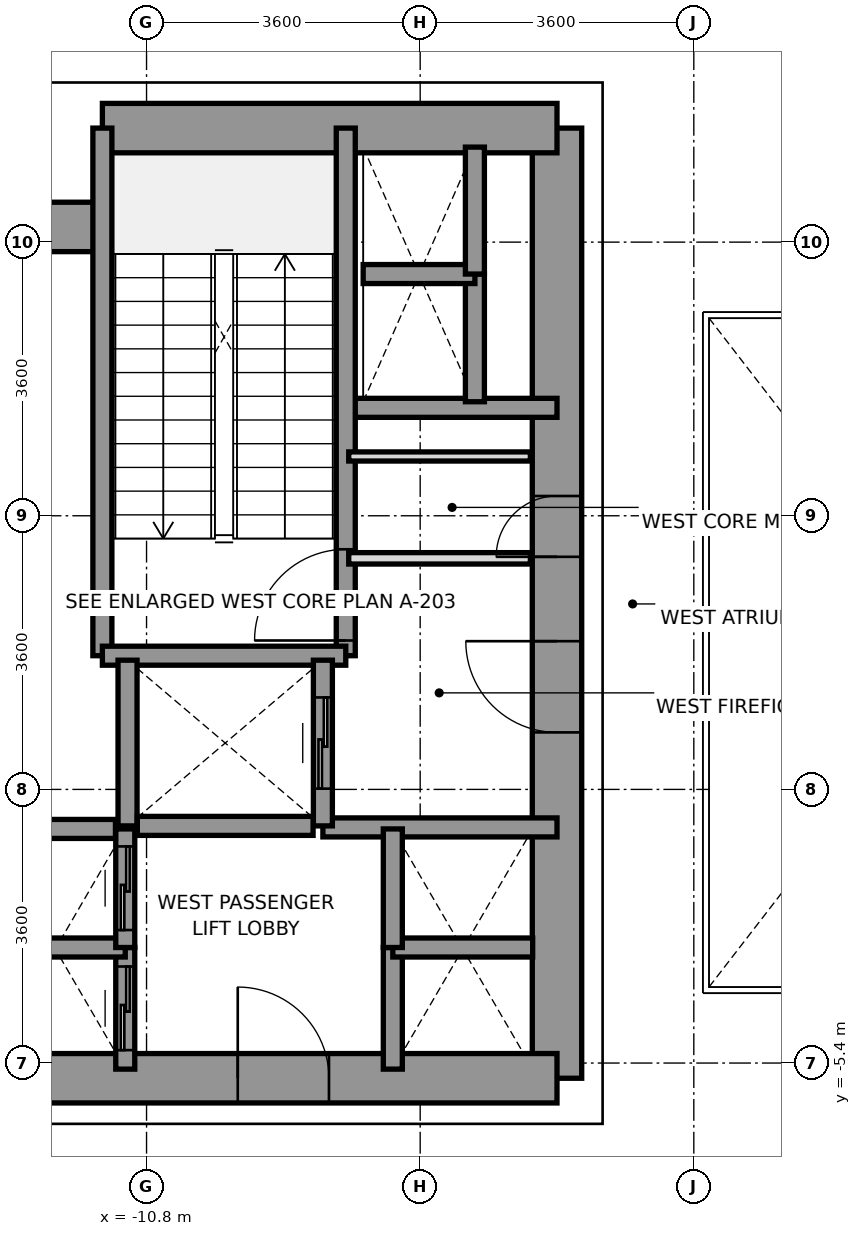
"""IFC4 building model, lengths in metres.
Left out: names, types, materials, properties, quantities, classifications, styles, units other than length and angle.
Written with IfcOpenShell. Run it as: python <this file> out.ifc"""

import sys

from ifc_helpers import new_model, si_unit, direction, frame, frame_2d, origin, place, context, subcontext, project, spatial, rectangle, extrude, source, transform, mapped, element, fill, save


model = new_model("IFC4")
c1 = context("Model", 3, precision=1e-05, world=origin(), true_north=direction((0.0, 1.0)))
c2 = subcontext(c1, "Body", "Model", "MODEL_VIEW")
j1 = project(units=[si_unit("LENGTHUNIT", "METRE"), si_unit("PLANEANGLEUNIT", "RADIAN")], contexts=[c1])
p1 = place(None, origin())
s1 = spatial("IfcSite", under=j1, at=p1, CompositionType="ELEMENT")
p2 = place(p1, origin())
s2 = spatial("IfcBuilding", under=s1, at=p2, CompositionType="ELEMENT")
p3 = place(p2, frame((0.0, 0.0, 20.4)))
s3 = spatial("IfcBuildingStorey", under=s2, at=p3, CompositionType="ELEMENT", Elevation=20.4)
p4 = place(p3, frame((-5.4, -5.6, 0.0), z_axis=(0.0, 0.0, 1.0), x_axis=(0.0, 1.0, 0.0)))
e1 = element("IfcWall", 1, at=p4, inside=s3, PredefinedType="SHEAR", context=c2, shape_type="SweptSolid", body=[
    extrude(rectangle(XDim=12.5, YDim=0.65, at=frame_2d((6.25, 0.0))), origin(), (0.0, 0.0, 1.0), 4.48),
])
p5 = place(p4, frame((4.55, 0.0, 0.0)))
e2 = element("IfcOpeningElement", 2, at=p5, cuts=e1, PredefinedType="OPENING", context=c2, shape_type="SweptSolid", body=[
    extrude(rectangle(XDim=1.2, YDim=2.2, at=frame_2d((0.6, 1.1))), frame((0.0, 0.335, 0.0), z_axis=(0.0, -1.0, 0.0), x_axis=(1.0, 0.0, 0.0)), (0.0, 0.0, 1.0), 0.67),
])
p6 = place(p4, frame((6.86, 0.0, 0.0)))
e3 = element("IfcOpeningElement", 3, at=p6, cuts=e1, PredefinedType="OPENING", context=c2, shape_type="SweptSolid", body=[
    extrude(rectangle(XDim=0.8, YDim=2.1, at=frame_2d((0.4, 1.05))), frame((0.0, 0.335, 0.0), z_axis=(0.0, -1.0, 0.0), x_axis=(1.0, 0.0, 0.0)), (0.0, 0.0, 1.0), 0.67),
])
p7 = place(p3, frame((-11.381, 6.9, 0.0), z_axis=(0.0, 0.0, 1.0), x_axis=(1.0, 0.0, 0.0)))
e4 = element("IfcWall", 4, at=p7, inside=s3, PredefinedType="SHEAR", context=c2, shape_type="SweptSolid", body=[
    extrude(rectangle(XDim=5.981, YDim=0.65, at=frame_2d((2.991, 0.0))), origin(), (0.0, 0.0, 1.0), 4.48),
])
p8 = place(p3, frame((-13.2, 5.6, 0.0), z_axis=(0.0, 0.0, 1.0), x_axis=(1.0, 0.0, 0.0)))
e5 = element("IfcWall", 5, at=p8, inside=s3, PredefinedType="SHEAR", context=c2, shape_type="SweptSolid", body=[
    extrude(rectangle(XDim=1.819, YDim=0.65, at=frame_2d((0.909, 0.0))), origin(), (0.0, 0.0, 1.0), 4.48),
])
p9 = place(p3, frame((-13.2, -5.6, 0.0), z_axis=(0.0, 0.0, 1.0), x_axis=(1.0, 0.0, 0.0)))
e6 = element("IfcWall", 6, at=p9, inside=s3, PredefinedType="SHEAR", context=c2, shape_type="SweptSolid", body=[
    extrude(rectangle(XDim=7.8, YDim=0.65, at=frame_2d((3.9, 0.0))), origin(), (0.0, 0.0, 1.0), 4.48),
])
p10 = place(p9, frame((3.6, 0.0, 0.0)))
e7 = element("IfcOpeningElement", 7, at=p10, cuts=e6, PredefinedType="OPENING", context=c2, shape_type="SweptSolid", body=[
    extrude(rectangle(XDim=1.2, YDim=2.2, at=frame_2d((0.6, 1.1))), frame((0.0, 0.335, 0.0), z_axis=(0.0, -1.0, 0.0), x_axis=(1.0, 0.0, 0.0)), (0.0, 0.0, 1.0), 0.67),
])
p11 = place(p3, frame((-8.18, 3.22, 0.0), z_axis=(0.0, 0.0, 1.0), x_axis=(1.0, 0.0, 0.0)))
e8 = element("IfcWall", 8, at=p11, inside=s3, PredefinedType="SOLIDWALL", context=c2, shape_type="SweptSolid", body=[
    extrude(rectangle(XDim=2.78, YDim=0.25, at=frame_2d((1.39, 0.0))), origin(), (0.0, 0.0, 1.0), 4.48),
])
p12 = place(p3, frame((-8.48, -2.3, 0.0), z_axis=(0.0, 0.0, 1.0), x_axis=(1.0, 0.0, 0.0)))
e9 = element("IfcWall", 9, at=p12, inside=s3, PredefinedType="SOLIDWALL", context=c2, shape_type="SweptSolid", body=[
    extrude(rectangle(XDim=3.08, YDim=0.25, at=frame_2d((1.54, 0.0))), origin(), (0.0, 0.0, 1.0), 4.48),
])
p13 = place(p3, frame((-8.179, -0.041, 0.0), z_axis=(0.0, 0.0, 1.0), x_axis=(0.0, 1.0, 0.0)))
e10 = element("IfcWall", 10, at=p13, inside=s3, PredefinedType="SOLIDWALL", context=c2, shape_type="SweptSolid", body=[
    extrude(rectangle(XDim=6.941, YDim=0.25, at=frame_2d((3.47, 0.0))), origin(), (0.0, 0.0, 1.0), 4.48),
])
p14 = place(p13, frame((0.2, 0.0, 0.0)))
e11 = element("IfcOpeningElement", 11, at=p14, cuts=e10, PredefinedType="OPENING", context=c2, shape_type="SweptSolid", body=[
    extrude(rectangle(XDim=1.2, YDim=2.2, at=frame_2d((0.6, 1.1))), frame((0.0, 0.135, 0.0), z_axis=(0.0, -1.0, 0.0), x_axis=(1.0, 0.0, 0.0)), (0.0, 0.0, 1.0), 0.27),
])
p15 = place(p3, frame((-11.381, -0.041, 0.0), z_axis=(0.0, 0.0, 1.0), x_axis=(0.0, 1.0, 0.0)))
e12 = element("IfcWall", 12, at=p15, inside=s3, PredefinedType="SOLIDWALL", context=c2, shape_type="SweptSolid", body=[
    extrude(rectangle(XDim=6.941, YDim=0.25, at=frame_2d((3.47, 0.0))), origin(), (0.0, 0.0, 1.0), 4.48),
])
p16 = place(p3, frame((-11.381, -0.041, 0.0), z_axis=(0.0, 0.0, 1.0), x_axis=(1.0, 0.0, 0.0)))
e13 = element("IfcWall", 13, at=p16, inside=s3, PredefinedType="SOLIDWALL", context=c2, shape_type="SweptSolid", body=[
    extrude(rectangle(XDim=3.202, YDim=0.25, at=frame_2d((1.601, 0.0))), origin(), (0.0, 0.0, 1.0), 4.48),
])
p17 = place(p3, frame((-11.05, -2.28, 0.0), z_axis=(0.0, 0.0, 1.0), x_axis=(0.0, 1.0, 0.0)))
e14 = element("IfcWall", 14, at=p17, inside=s3, PredefinedType="SOLIDWALL", context=c2, shape_type="SweptSolid", body=[
    extrude(rectangle(XDim=2.18, YDim=0.25, at=frame_2d((1.09, 0.0))), origin(), (0.0, 0.0, 1.0), 4.48),
])
p18 = place(p3, frame((-8.48, -2.28, 0.0), z_axis=(0.0, 0.0, 1.0), x_axis=(0.0, 1.0, 0.0)))
e15 = element("IfcWall", 15, at=p18, inside=s3, PredefinedType="SOLIDWALL", context=c2, shape_type="SweptSolid", body=[
    extrude(rectangle(XDim=2.18, YDim=0.25, at=frame_2d((1.09, 0.0))), origin(), (0.0, 0.0, 1.0), 4.48),
])
p19 = place(p18, frame((0.49, 0.0, 0.0)))
e16 = element("IfcOpeningElement", 16, at=p19, cuts=e15, PredefinedType="OPENING", context=c2, shape_type="SweptSolid", body=[
    extrude(rectangle(XDim=1.2, YDim=2.2, at=frame_2d((0.6, 1.1))), frame((0.0, 0.135, 0.0), z_axis=(0.0, -1.0, 0.0), x_axis=(1.0, 0.0, 0.0)), (0.0, 0.0, 1.0), 0.27),
])
p20 = place(p3, frame((-10.921, -2.28, 0.0), z_axis=(0.0, 0.0, 1.0), x_axis=(1.0, 0.0, 0.0)))
e17 = element("IfcWall", 17, at=p20, inside=s3, PredefinedType="SOLIDWALL", context=c2, shape_type="SweptSolid", body=[
    extrude(rectangle(XDim=2.312, YDim=0.25, at=frame_2d((1.156, 0.0))), origin(), (0.0, 0.0, 1.0), 4.48),
])
p21 = place(p3, frame((-11.08, -5.48, 0.0), z_axis=(0.0, 0.0, 1.0), x_axis=(0.0, 1.0, 0.0)))
e18 = element("IfcWall", 18, at=p21, inside=s3, PredefinedType="SOLIDWALL", context=c2, shape_type="SweptSolid", body=[
    extrude(rectangle(XDim=1.6, YDim=0.25, at=frame_2d((0.8, 0.0))), origin(), (0.0, 0.0, 1.0), 4.48),
])
p22 = place(p21, frame((0.25, 0.0, 0.0)))
e19 = element("IfcOpeningElement", 19, at=p22, cuts=e18, PredefinedType="OPENING", context=c2, shape_type="SweptSolid", body=[
    extrude(rectangle(XDim=1.1, YDim=2.2, at=frame_2d((0.55, 1.1))), frame((0.0, 0.135, 0.0), z_axis=(0.0, -1.0, 0.0), x_axis=(1.0, 0.0, 0.0)), (0.0, 0.0, 1.0), 0.27),
])
p23 = place(p3, frame((-12.92, -3.88, 0.0), z_axis=(0.0, 0.0, 1.0), x_axis=(1.0, 0.0, 0.0)))
e20 = element("IfcWall", 20, at=p23, inside=s3, PredefinedType="SOLIDWALL", context=c2, shape_type="SweptSolid", body=[
    extrude(rectangle(XDim=1.84, YDim=0.25, at=frame_2d((0.92, 0.0))), origin(), (0.0, 0.0, 1.0), 4.48),
])
p24 = place(p3, frame((-11.08, -3.88, 0.0), z_axis=(0.0, 0.0, 1.0), x_axis=(0.0, 1.0, 0.0)))
e21 = element("IfcWall", 21, at=p24, inside=s3, PredefinedType="SOLIDWALL", context=c2, shape_type="SweptSolid", body=[
    extrude(rectangle(XDim=1.56, YDim=0.25, at=frame_2d((0.78, 0.0))), origin(), (0.0, 0.0, 1.0), 4.48),
])
p25 = place(p24, frame((0.23, 0.0, 0.0)))
e22 = element("IfcOpeningElement", 22, at=p25, cuts=e21, PredefinedType="OPENING", context=c2, shape_type="SweptSolid", body=[
    extrude(rectangle(XDim=1.1, YDim=2.2, at=frame_2d((0.55, 1.1))), frame((0.0, 0.135, 0.0), z_axis=(0.0, -1.0, 0.0), x_axis=(1.0, 0.0, 0.0)), (0.0, 0.0, 1.0), 0.27),
])
p26 = place(p3, frame((-12.791, -2.32, 0.0), z_axis=(0.0, 0.0, 1.0), x_axis=(1.0, 0.0, 0.0)))
e23 = element("IfcWall", 23, at=p26, inside=s3, PredefinedType="SOLIDWALL", context=c2, shape_type="SweptSolid", body=[
    extrude(rectangle(XDim=1.582, YDim=0.25, at=frame_2d((0.791, 0.0))), origin(), (0.0, 0.0, 1.0), 4.48),
])
p27 = place(p3, frame((-7.56, -5.48, 0.0), z_axis=(0.0, 0.0, 1.0), x_axis=(0.0, 1.0, 0.0)))
e24 = element("IfcWall", 24, at=p27, inside=s3, PredefinedType="SOLIDWALL", context=c2, shape_type="SweptSolid", body=[
    extrude(rectangle(XDim=1.6, YDim=0.25, at=frame_2d((0.8, 0.0))), origin(), (0.0, 0.0, 1.0), 4.48),
])
p28 = place(p3, frame((-7.56, -3.88, 0.0), z_axis=(0.0, 0.0, 1.0), x_axis=(1.0, 0.0, 0.0)))
e25 = element("IfcWall", 25, at=p28, inside=s3, PredefinedType="SOLIDWALL", context=c2, shape_type="SweptSolid", body=[
    extrude(rectangle(XDim=1.84, YDim=0.25, at=frame_2d((0.92, 0.0))), origin(), (0.0, 0.0, 1.0), 4.48),
])
p29 = place(p3, frame((-7.56, -3.88, 0.0), z_axis=(0.0, 0.0, 1.0), x_axis=(0.0, 1.0, 0.0)))
e26 = element("IfcWall", 26, at=p29, inside=s3, PredefinedType="SOLIDWALL", context=c2, shape_type="SweptSolid", body=[
    extrude(rectangle(XDim=1.56, YDim=0.25, at=frame_2d((0.78, 0.0))), origin(), (0.0, 0.0, 1.0), 4.48),
])
p30 = place(p3, frame((-6.48, 3.3, 0.0), z_axis=(0.0, 0.0, 1.0), x_axis=(0.0, 1.0, 0.0)))
e27 = element("IfcWall", 27, at=p30, inside=s3, PredefinedType="SOLIDWALL", context=c2, shape_type="SweptSolid", body=[
    extrude(rectangle(XDim=1.68, YDim=0.25, at=frame_2d((0.84, 0.0))), origin(), (0.0, 0.0, 1.0), 4.48),
])
p31 = place(p3, frame((-7.95, 4.98, 0.0), z_axis=(0.0, 0.0, 1.0), x_axis=(1.0, 0.0, 0.0)))
e28 = element("IfcWall", 28, at=p31, inside=s3, PredefinedType="SOLIDWALL", context=c2, shape_type="SweptSolid", body=[
    extrude(rectangle(XDim=1.47, YDim=0.25, at=frame_2d((0.735, 0.0))), origin(), (0.0, 0.0, 1.0), 4.48),
])
p32 = place(p3, frame((-6.48, 4.98, 0.0), z_axis=(0.0, 0.0, 1.0), x_axis=(0.0, 1.0, 0.0)))
e29 = element("IfcWall", 29, at=p32, inside=s3, PredefinedType="SOLIDWALL", context=c2, shape_type="SweptSolid", body=[
    extrude(rectangle(XDim=1.67, YDim=0.25, at=frame_2d((0.835, 0.0))), origin(), (0.0, 0.0, 1.0), 4.48),
])
p33 = place(p3, frame((-8.14, 1.24, 0.0), z_axis=(0.0, 0.0, 1.0), x_axis=(1.0, 0.0, 0.0)))
e30 = element("IfcWall", 30, at=p33, inside=s3, PredefinedType="PARTITIONING", context=c2, shape_type="SweptSolid", body=[
    extrude(rectangle(XDim=2.39, YDim=0.15, at=frame_2d((1.195, 0.0))), origin(), (0.0, 0.0, 1.0), 3.58),
])
p34 = place(p3, frame((-8.14, 2.58, 0.0), z_axis=(0.0, 0.0, 1.0), x_axis=(1.0, 0.0, 0.0)))
e31 = element("IfcWall", 31, at=p34, inside=s3, PredefinedType="PARTITIONING", context=c2, shape_type="SweptSolid", body=[
    extrude(rectangle(XDim=2.39, YDim=0.12, at=frame_2d((1.195, 0.0))), origin(), (0.0, 0.0, 1.0), 3.58),
])
m1 = source(origin(), c2, "Body", "SweptSolid", [
    extrude(rectangle(XDim=1.2, YDim=2.2, at=frame_2d((0.6, 1.1))), frame((0.0, 0.025, 0.0), z_axis=(0.0, -1.0, 0.0), x_axis=(1.0, 0.0, 0.0)), (0.0, 0.0, 1.0), 0.05),
])
p35 = place(p14, origin())
e32 = element("IfcDoor", 32, at=p35, inside=s3, OperationType="SINGLE_SWING_LEFT", PredefinedType="DOOR", context=c2, shape_type="MappedRepresentation", body=[
    mapped(m1, transform((0.0, 0.0, 0.0), x_axis=(1.0, 0.0, 0.0), y_axis=(0.0, 1.0, 0.0), z_axis=(0.0, 0.0, 1.0), scale=1.0)),
])
fill(e11, e32)
p36 = place(p5, origin())
e33 = element("IfcDoor", 33, at=p36, inside=s3, OperationType="SINGLE_SWING_RIGHT", PredefinedType="DOOR", context=c2, shape_type="MappedRepresentation", body=[
    mapped(m1, transform((0.0, 0.0, 0.0), x_axis=(1.0, 0.0, 0.0), y_axis=(0.0, 1.0, 0.0), z_axis=(0.0, 0.0, 1.0), scale=1.0)),
])
fill(e2, e33)
p37 = place(p10, origin())
e34 = element("IfcDoor", 34, at=p37, inside=s3, OperationType="SINGLE_SWING_LEFT", PredefinedType="DOOR", context=c2, shape_type="MappedRepresentation", body=[
    mapped(m1, transform((0.0, 0.0, 0.0), x_axis=(1.0, 0.0, 0.0), y_axis=(0.0, 1.0, 0.0), z_axis=(0.0, 0.0, 1.0), scale=1.0)),
])
fill(e7, e34)
m2 = source(origin(), c2, "Body", "SweptSolid", [
    extrude(rectangle(XDim=0.8, YDim=2.1, at=frame_2d((0.4, 1.05))), frame((0.0, 0.025, 0.0), z_axis=(0.0, -1.0, 0.0), x_axis=(1.0, 0.0, 0.0)), (0.0, 0.0, 1.0), 0.05),
])
p38 = place(p6, origin())
e35 = element("IfcDoor", 35, at=p38, inside=s3, OperationType="SINGLE_SWING_LEFT", PredefinedType="DOOR", context=c2, shape_type="MappedRepresentation", body=[
    mapped(m2, transform((0.0, 0.0, 0.0), x_axis=(1.0, 0.0, 0.0), y_axis=(0.0, 1.0, 0.0), z_axis=(0.0, 0.0, 1.0), scale=1.0)),
])
fill(e3, e35)
p39 = place(p19, origin())
e36 = element("IfcDoor", 36, at=p39, inside=s3, OperationType="SLIDING_TO_RIGHT", PredefinedType="DOOR", context=c2, shape_type="MappedRepresentation", body=[
    mapped(m1, transform((0.0, 0.0, 0.0), x_axis=(1.0, 0.0, 0.0), y_axis=(0.0, 1.0, 0.0), z_axis=(0.0, 0.0, 1.0), scale=1.0)),
])
fill(e16, e36)
m3 = source(origin(), c2, "Body", "SweptSolid", [
    extrude(rectangle(XDim=1.1, YDim=2.2, at=frame_2d((0.55, 1.1))), frame((0.0, 0.025, 0.0), z_axis=(0.0, -1.0, 0.0), x_axis=(1.0, 0.0, 0.0)), (0.0, 0.0, 1.0), 0.05),
])
p40 = place(p22, origin())
e37 = element("IfcDoor", 37, at=p40, inside=s3, OperationType="SLIDING_TO_LEFT", PredefinedType="DOOR", context=c2, shape_type="MappedRepresentation", body=[
    mapped(m3, transform((0.0, 0.0, 0.0), x_axis=(1.0, 0.0, 0.0), y_axis=(0.0, 1.0, 0.0), z_axis=(0.0, 0.0, 1.0), scale=1.0)),
])
fill(e19, e37)
p41 = place(p25, origin())
e38 = element("IfcDoor", 38, at=p41, inside=s3, OperationType="SLIDING_TO_LEFT", PredefinedType="DOOR", context=c2, shape_type="MappedRepresentation", body=[
    mapped(m3, transform((0.0, 0.0, 0.0), x_axis=(1.0, 0.0, 0.0), y_axis=(0.0, 1.0, 0.0), z_axis=(0.0, 0.0, 1.0), scale=1.0)),
])
fill(e22, e38)
save(model, sys.argv[1])
